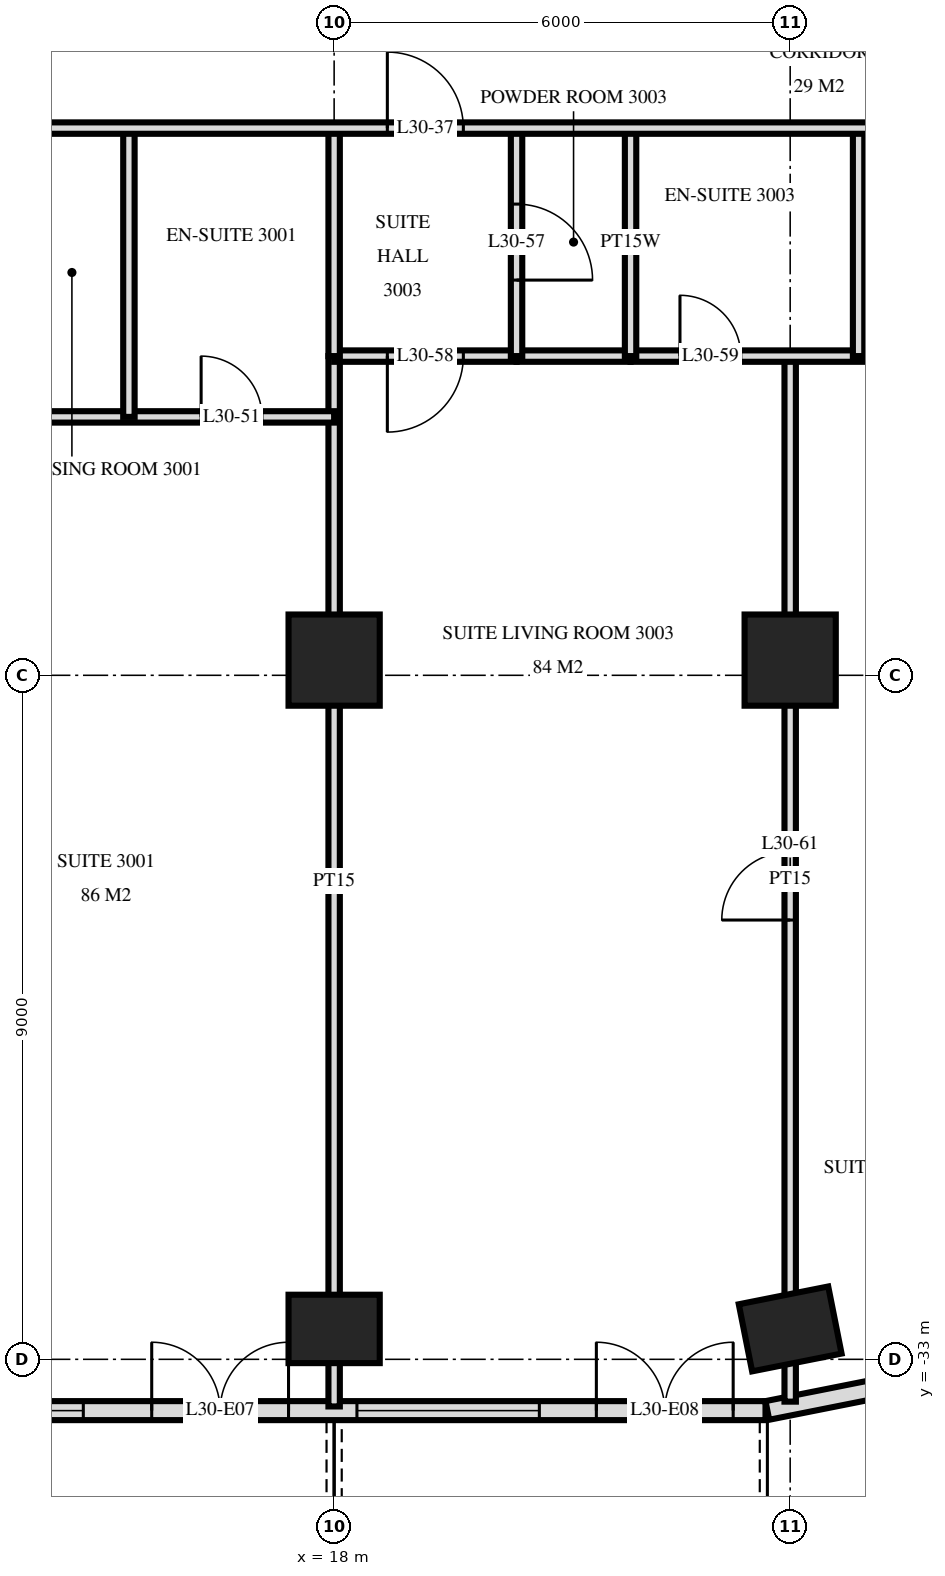
"""IFC4 building model, lengths in metres.
Left out: names, types, materials, properties, quantities, classifications, styles, units other than length and angle.
Written with IfcOpenShell. Run it as: python <this file> out.ifc"""

import sys

from ifc_helpers import new_model, si_unit, direction, frame, frame_2d, origin, origin_2d, place, context, subcontext, project, spatial, rectangle, extrude, element, fill, save


model = new_model("IFC4")
c1 = context("Model", 3, precision=1e-05, world=origin(), true_north=direction((0.0, 1.0)))
c2 = subcontext(c1, "Body", "Model", "MODEL_VIEW")
j1 = project(units=[si_unit("LENGTHUNIT", "METRE"), si_unit("PLANEANGLEUNIT", "RADIAN")], contexts=[c1])
p1 = place(None, origin())
s1 = spatial("IfcSite", under=j1, at=p1, CompositionType="ELEMENT")
p2 = place(p1, origin())
s2 = spatial("IfcBuilding", under=s1, at=p2, CompositionType="ELEMENT")
p3 = place(p2, frame((0.0, 0.0, 120.0)))
s3 = spatial("IfcBuildingStorey", under=s2, at=p3, CompositionType="ELEMENT", Elevation=120.0)
p4 = place(p3, frame((18.0, -32.6, 0.0), z_axis=(0.0, 0.0, 1.0), x_axis=(1.0, 0.0, 0.0)))
e1 = element("IfcColumn", 1, at=p4, inside=s3, PredefinedType="COLUMN", context=c2, shape_type="SweptSolid", body=[
    extrude(rectangle(XDim=1.2, YDim=0.9, at=origin_2d()), origin(), (0.0, 0.0, 1.0), 3.6),
])
p5 = place(p3, frame((18.0, -23.8, 0.0), z_axis=(0.0, 0.0, 1.0), x_axis=(1.0, 0.0, 0.0)))
e2 = element("IfcColumn", 2, at=p5, inside=s3, PredefinedType="COLUMN", context=c2, shape_type="SweptSolid", body=[
    extrude(rectangle(XDim=1.2, YDim=1.2, at=origin_2d()), origin(), (0.0, 0.0, 1.0), 3.6),
])
p6 = place(p3, frame((24.0, -32.6, 0.0), z_axis=(0.0, 0.0, 1.0), x_axis=(0.980792089743, 0.195056086032, 0.0)))
e3 = element("IfcColumn", 3, at=p6, inside=s3, PredefinedType="COLUMN", context=c2, shape_type="SweptSolid", body=[
    extrude(rectangle(XDim=1.2, YDim=0.9, at=origin_2d()), origin(), (0.0, 0.0, 1.0), 3.6),
])
p7 = place(p3, frame((24.0, -23.8, 0.0), z_axis=(0.0, 0.0, 1.0), x_axis=(1.0, 0.0, 0.0)))
e4 = element("IfcColumn", 4, at=p7, inside=s3, PredefinedType="COLUMN", context=c2, shape_type="SweptSolid", body=[
    extrude(rectangle(XDim=1.2, YDim=1.2, at=origin_2d()), origin(), (0.0, 0.0, 1.0), 3.6),
])
p8 = place(p3, frame((-23.675, -33.675, 0.0), z_axis=(0.0, 0.0, 1.0), x_axis=(1.0, 0.0, 0.0)))
e5 = element("IfcWall", 5, at=p8, inside=s3, PredefinedType="SOLIDWALL", context=c2, shape_type="SweptSolid", body=[
    extrude(rectangle(XDim=47.351, YDim=0.25, at=frame_2d((23.675, 0.0))), origin(), (0.0, 0.0, 1.0), 3.32),
])
p9 = place(p8, frame((0.275, 0.0, 0.3)))
e6 = element("IfcOpeningElement", 6, at=p9, cuts=e5, PredefinedType="OPENING", context=c2, shape_type="SweptSolid", body=[
    extrude(rectangle(XDim=2.4, YDim=2.1, at=frame_2d((1.2, 1.05))), frame((0.0, 0.135, 0.0), z_axis=(0.0, -1.0, 0.0), x_axis=(1.0, 0.0, 0.0)), (0.0, 0.0, 1.0), 0.27),
])
p10 = place(p8, frame((3.425, 0.0, 0.0)))
e7 = element("IfcOpeningElement", 7, at=p10, cuts=e5, PredefinedType="OPENING", context=c2, shape_type="SweptSolid", body=[
    extrude(rectangle(XDim=1.8, YDim=2.4, at=frame_2d((0.9, 1.2))), frame((0.0, 0.135, 0.0), z_axis=(0.0, -1.0, 0.0), x_axis=(1.0, 0.0, 0.0)), (0.0, 0.0, 1.0), 0.27),
])
p11 = place(p8, frame((7.775, 0.0, 0.0)))
e8 = element("IfcOpeningElement", 8, at=p11, cuts=e5, PredefinedType="OPENING", context=c2, shape_type="SweptSolid", body=[
    extrude(rectangle(XDim=1.8, YDim=2.4, at=frame_2d((0.9, 1.2))), frame((0.0, 0.135, 0.0), z_axis=(0.0, -1.0, 0.0), x_axis=(1.0, 0.0, 0.0)), (0.0, 0.0, 1.0), 0.27),
])
p12 = place(p8, frame((12.275, 0.0, 0.0)))
e9 = element("IfcOpeningElement", 9, at=p12, cuts=e5, PredefinedType="OPENING", context=c2, shape_type="SweptSolid", body=[
    extrude(rectangle(XDim=1.8, YDim=2.4, at=frame_2d((0.9, 1.2))), frame((0.0, 0.135, 0.0), z_axis=(0.0, -1.0, 0.0), x_axis=(1.0, 0.0, 0.0)), (0.0, 0.0, 1.0), 0.27),
])
p13 = place(p8, frame((14.975, 0.0, 0.3)))
e10 = element("IfcOpeningElement", 10, at=p13, cuts=e5, PredefinedType="OPENING", context=c2, shape_type="SweptSolid", body=[
    extrude(rectangle(XDim=2.4, YDim=2.1, at=frame_2d((1.2, 1.05))), frame((0.0, 0.135, 0.0), z_axis=(0.0, -1.0, 0.0), x_axis=(1.0, 0.0, 0.0)), (0.0, 0.0, 1.0), 0.27),
])
p14 = place(p8, frame((17.975, 0.0, 0.3)))
e11 = element("IfcOpeningElement", 11, at=p14, cuts=e5, PredefinedType="OPENING", context=c2, shape_type="SweptSolid", body=[
    extrude(rectangle(XDim=2.4, YDim=2.1, at=frame_2d((1.2, 1.05))), frame((0.0, 0.135, 0.0), z_axis=(0.0, -1.0, 0.0), x_axis=(1.0, 0.0, 0.0)), (0.0, 0.0, 1.0), 0.27),
])
p15 = place(p8, frame((21.275, 0.0, 0.0)))
e12 = element("IfcOpeningElement", 12, at=p15, cuts=e5, PredefinedType="OPENING", context=c2, shape_type="SweptSolid", body=[
    extrude(rectangle(XDim=1.8, YDim=2.4, at=frame_2d((0.9, 1.2))), frame((0.0, 0.135, 0.0), z_axis=(0.0, -1.0, 0.0), x_axis=(1.0, 0.0, 0.0)), (0.0, 0.0, 1.0), 0.27),
])
p16 = place(p8, frame((24.275, 0.0, 0.0)))
e13 = element("IfcOpeningElement", 13, at=p16, cuts=e5, PredefinedType="OPENING", context=c2, shape_type="SweptSolid", body=[
    extrude(rectangle(XDim=1.8, YDim=2.4, at=frame_2d((0.9, 1.2))), frame((0.0, 0.135, 0.0), z_axis=(0.0, -1.0, 0.0), x_axis=(1.0, 0.0, 0.0)), (0.0, 0.0, 1.0), 0.27),
])
p17 = place(p8, frame((26.975, 0.0, 0.3)))
e14 = element("IfcOpeningElement", 14, at=p17, cuts=e5, PredefinedType="OPENING", context=c2, shape_type="SweptSolid", body=[
    extrude(rectangle(XDim=2.4, YDim=2.1, at=frame_2d((1.2, 1.05))), frame((0.0, 0.135, 0.0), z_axis=(0.0, -1.0, 0.0), x_axis=(1.0, 0.0, 0.0)), (0.0, 0.0, 1.0), 0.27),
])
p18 = place(p8, frame((30.275, 0.0, 0.0)))
e15 = element("IfcOpeningElement", 15, at=p18, cuts=e5, PredefinedType="OPENING", context=c2, shape_type="SweptSolid", body=[
    extrude(rectangle(XDim=1.8, YDim=2.4, at=frame_2d((0.9, 1.2))), frame((0.0, 0.135, 0.0), z_axis=(0.0, -1.0, 0.0), x_axis=(1.0, 0.0, 0.0)), (0.0, 0.0, 1.0), 0.27),
])
p19 = place(p8, frame((32.975, 0.0, 0.3)))
e16 = element("IfcOpeningElement", 16, at=p19, cuts=e5, PredefinedType="OPENING", context=c2, shape_type="SweptSolid", body=[
    extrude(rectangle(XDim=2.4, YDim=2.1, at=frame_2d((1.2, 1.05))), frame((0.0, 0.135, 0.0), z_axis=(0.0, -1.0, 0.0), x_axis=(1.0, 0.0, 0.0)), (0.0, 0.0, 1.0), 0.27),
])
p20 = place(p8, frame((35.975, 0.0, 0.3)))
e17 = element("IfcOpeningElement", 17, at=p20, cuts=e5, PredefinedType="OPENING", context=c2, shape_type="SweptSolid", body=[
    extrude(rectangle(XDim=2.4, YDim=2.1, at=frame_2d((1.2, 1.05))), frame((0.0, 0.135, 0.0), z_axis=(0.0, -1.0, 0.0), x_axis=(1.0, 0.0, 0.0)), (0.0, 0.0, 1.0), 0.27),
])
p21 = place(p8, frame((39.275, 0.0, 0.0)))
e18 = element("IfcOpeningElement", 18, at=p21, cuts=e5, PredefinedType="OPENING", context=c2, shape_type="SweptSolid", body=[
    extrude(rectangle(XDim=1.8, YDim=2.4, at=frame_2d((0.9, 1.2))), frame((0.0, 0.135, 0.0), z_axis=(0.0, -1.0, 0.0), x_axis=(1.0, 0.0, 0.0)), (0.0, 0.0, 1.0), 0.27),
])
p22 = place(p8, frame((41.975, 0.0, 0.3)))
e19 = element("IfcOpeningElement", 19, at=p22, cuts=e5, PredefinedType="OPENING", context=c2, shape_type="SweptSolid", body=[
    extrude(rectangle(XDim=2.4, YDim=2.1, at=frame_2d((1.2, 1.05))), frame((0.0, 0.135, 0.0), z_axis=(0.0, -1.0, 0.0), x_axis=(1.0, 0.0, 0.0)), (0.0, 0.0, 1.0), 0.27),
])
p23 = place(p8, frame((45.125, 0.0, 0.0)))
e20 = element("IfcOpeningElement", 20, at=p23, cuts=e5, PredefinedType="OPENING", context=c2, shape_type="SweptSolid", body=[
    extrude(rectangle(XDim=1.8, YDim=2.4, at=frame_2d((0.9, 1.2))), frame((0.0, 0.135, 0.0), z_axis=(0.0, -1.0, 0.0), x_axis=(1.0, 0.0, 0.0)), (0.0, 0.0, 1.0), 0.27),
])
p24 = place(p3, frame((23.7, -33.673, 0.0), z_axis=(0.0, 0.0, 1.0), x_axis=(0.980775640221, 0.19513878023, 0.0)))
e21 = element("IfcWall", 21, at=p24, inside=s3, PredefinedType="SOLIDWALL", context=c2, shape_type="SweptSolid", body=[
    extrude(rectangle(XDim=1.681, YDim=0.25, at=frame_2d((0.841, 0.0))), origin(), (0.0, 0.0, 1.0), 3.32),
])
p25 = place(p3, frame((24.9, -19.8, 0.0), z_axis=(0.0, 0.0, 1.0), x_axis=(0.0, 1.0, 0.0)))
e22 = element("IfcWall", 22, at=p25, inside=s3, PredefinedType="PARTITIONING", context=c2, shape_type="SweptSolid", body=[
    extrude(rectangle(XDim=3.0, YDim=0.15, at=frame_2d((1.5, 0.0))), origin(), (0.0, 0.0, 1.0), 3.32),
])
p26 = place(p3, frame((24.0, -33.557, 0.0), z_axis=(0.0, 0.0, 1.0), x_axis=(0.0, 1.0, 0.0)))
e23 = element("IfcWall", 23, at=p26, inside=s3, PredefinedType="PARTITIONING", context=c2, shape_type="SweptSolid", body=[
    extrude(rectangle(XDim=13.757, YDim=0.15, at=frame_2d((6.878, 0.0))), origin(), (0.0, 0.0, 1.0), 3.32),
])
p27 = place(p26, frame((6.337, 0.0, 0.0)))
e24 = element("IfcOpeningElement", 24, at=p27, cuts=e23, PredefinedType="OPENING", context=c2, shape_type="SweptSolid", body=[
    extrude(rectangle(XDim=0.9, YDim=2.1, at=frame_2d((0.45, 1.05))), frame((0.0, 0.085, 0.0), z_axis=(0.0, -1.0, 0.0), x_axis=(1.0, 0.0, 0.0)), (0.0, 0.0, 1.0), 0.17),
])
p28 = place(p3, frame((21.9, -19.8, 0.0), z_axis=(0.0, 0.0, 1.0), x_axis=(0.0, 1.0, 0.0)))
e25 = element("IfcWall", 25, at=p28, inside=s3, PredefinedType="PLUMBINGWALL", context=c2, shape_type="SweptSolid", body=[
    extrude(rectangle(XDim=3.0, YDim=0.15, at=frame_2d((1.5, 0.0))), origin(), (0.0, 0.0, 1.0), 3.32),
])
p29 = place(p3, frame((20.4, -19.8, 0.0), z_axis=(0.0, 0.0, 1.0), x_axis=(0.0, 1.0, 0.0)))
e26 = element("IfcWall", 26, at=p29, inside=s3, PredefinedType="PARTITIONING", context=c2, shape_type="SweptSolid", body=[
    extrude(rectangle(XDim=3.0, YDim=0.15, at=frame_2d((1.5, 0.0))), origin(), (0.0, 0.0, 1.0), 3.32),
])
p30 = place(p29, frame((1.0, 0.0, 0.0)))
e27 = element("IfcOpeningElement", 27, at=p30, cuts=e26, PredefinedType="OPENING", context=c2, shape_type="SweptSolid", body=[
    extrude(rectangle(XDim=1.0, YDim=2.1, at=frame_2d((0.5, 1.05))), frame((0.0, 0.085, 0.0), z_axis=(0.0, -1.0, 0.0), x_axis=(1.0, 0.0, 0.0)), (0.0, 0.0, 1.0), 0.17),
])
p31 = place(p3, frame((18.0, -19.8, 0.0), z_axis=(0.0, 0.0, 1.0), x_axis=(0.0, 1.0, 0.0)))
e28 = element("IfcWall", 28, at=p31, inside=s3, PredefinedType="PARTITIONING", context=c2, shape_type="SweptSolid", body=[
    extrude(rectangle(XDim=3.0, YDim=0.15, at=frame_2d((1.5, 0.0))), origin(), (0.0, 0.0, 1.0), 3.32),
])
p32 = place(p3, frame((18.0, -33.62, 0.0), z_axis=(0.0, 0.0, 1.0), x_axis=(0.0, 1.0, 0.0)))
e29 = element("IfcWall", 29, at=p32, inside=s3, PredefinedType="PARTITIONING", context=c2, shape_type="SweptSolid", body=[
    extrude(rectangle(XDim=13.82, YDim=0.15, at=frame_2d((6.91, 0.0))), origin(), (0.0, 0.0, 1.0), 3.32),
])
p33 = place(p3, frame((15.3, -20.6, 0.0), z_axis=(0.0, 0.0, 1.0), x_axis=(0.0, 1.0, 0.0)))
e30 = element("IfcWall", 30, at=p33, inside=s3, PredefinedType="PARTITIONING", context=c2, shape_type="SweptSolid", body=[
    extrude(rectangle(XDim=3.8, YDim=0.15, at=frame_2d((1.9, 0.0))), origin(), (0.0, 0.0, 1.0), 3.32),
])
p34 = place(p3, frame((13.8, -20.6, 0.0), z_axis=(0.0, 0.0, 1.0), x_axis=(1.0, 0.0, 0.0)))
e31 = element("IfcWall", 31, at=p34, inside=s3, PredefinedType="PARTITIONING", context=c2, shape_type="SweptSolid", body=[
    extrude(rectangle(XDim=4.2, YDim=0.15, at=frame_2d((2.1, 0.0))), origin(), (0.0, 0.0, 1.0), 3.32),
])
p35 = place(p34, frame((2.45, 0.0, 0.0)))
e32 = element("IfcOpeningElement", 32, at=p35, cuts=e31, PredefinedType="OPENING", context=c2, shape_type="SweptSolid", body=[
    extrude(rectangle(XDim=0.8, YDim=2.1, at=frame_2d((0.4, 1.05))), frame((0.0, 0.085, 0.0), z_axis=(0.0, -1.0, 0.0), x_axis=(1.0, 0.0, 0.0)), (0.0, 0.0, 1.0), 0.17),
])
p36 = place(p3, frame((18.0, -19.8, 0.0), z_axis=(0.0, 0.0, 1.0), x_axis=(1.0, 0.0, 0.0)))
e33 = element("IfcWall", 33, at=p36, inside=s3, PredefinedType="PARTITIONING", context=c2, shape_type="SweptSolid", body=[
    extrude(rectangle(XDim=2.4, YDim=0.15, at=frame_2d((1.2, 0.0))), origin(), (0.0, 0.0, 1.0), 3.32),
])
p37 = place(p36, frame((0.7, 0.0, 0.0)))
e34 = element("IfcOpeningElement", 34, at=p37, cuts=e33, PredefinedType="OPENING", context=c2, shape_type="SweptSolid", body=[
    extrude(rectangle(XDim=1.0, YDim=2.1, at=frame_2d((0.5, 1.05))), frame((0.0, 0.085, 0.0), z_axis=(0.0, -1.0, 0.0), x_axis=(1.0, 0.0, 0.0)), (0.0, 0.0, 1.0), 0.17),
])
p38 = place(p3, frame((21.9, -19.8, 0.0), z_axis=(0.0, 0.0, 1.0), x_axis=(1.0, 0.0, 0.0)))
e35 = element("IfcWall", 35, at=p38, inside=s3, PredefinedType="PARTITIONING", context=c2, shape_type="SweptSolid", body=[
    extrude(rectangle(XDim=6.12, YDim=0.15, at=frame_2d((3.06, 0.0))), origin(), (0.0, 0.0, 1.0), 3.32),
])
p39 = place(p38, frame((0.65, 0.0, 0.0)))
e36 = element("IfcOpeningElement", 36, at=p39, cuts=e35, PredefinedType="OPENING", context=c2, shape_type="SweptSolid", body=[
    extrude(rectangle(XDim=0.8, YDim=2.1, at=frame_2d((0.4, 1.05))), frame((0.0, 0.085, 0.0), z_axis=(0.0, -1.0, 0.0), x_axis=(1.0, 0.0, 0.0)), (0.0, 0.0, 1.0), 0.17),
])
p40 = place(p38, frame((4.2, 0.0, 0.0)))
e37 = element("IfcOpeningElement", 37, at=p40, cuts=e35, PredefinedType="OPENING", context=c2, shape_type="SweptSolid", body=[
    extrude(rectangle(XDim=0.9, YDim=2.1, at=frame_2d((0.45, 1.05))), frame((0.0, 0.085, 0.0), z_axis=(0.0, -1.0, 0.0), x_axis=(1.0, 0.0, 0.0)), (0.0, 0.0, 1.0), 0.17),
])
p41 = place(p3, frame((20.4, -19.8, 0.0), z_axis=(0.0, 0.0, 1.0), x_axis=(1.0, 0.0, 0.0)))
e38 = element("IfcWall", 38, at=p41, inside=s3, PredefinedType="PLUMBINGWALL", context=c2, shape_type="SweptSolid", body=[
    extrude(rectangle(XDim=1.5, YDim=0.15, at=frame_2d((0.75, 0.0))), origin(), (0.0, 0.0, 1.0), 3.32),
])
p42 = place(p3, frame((-28.02, -16.8, 0.0), z_axis=(0.0, 0.0, 1.0), x_axis=(1.0, 0.0, 0.0)))
e39 = element("IfcWall", 39, at=p42, inside=s3, PredefinedType="PARTITIONING", context=c2, shape_type="SweptSolid", body=[
    extrude(rectangle(XDim=56.04, YDim=0.15, at=frame_2d((28.02, 0.0))), origin(), (0.0, 0.0, 1.0), 3.32),
])
p43 = place(p42, frame((12.52, 0.0, 0.0)))
e40 = element("IfcOpeningElement", 40, at=p43, cuts=e39, PredefinedType="OPENING", context=c2, shape_type="SweptSolid", body=[
    extrude(rectangle(XDim=1.0, YDim=2.1, at=frame_2d((0.5, 1.05))), frame((0.0, 0.085, 0.0), z_axis=(0.0, -1.0, 0.0), x_axis=(1.0, 0.0, 0.0)), (0.0, 0.0, 1.0), 0.17),
])
p44 = place(p42, frame((8.32, 0.0, 0.0)))
e41 = element("IfcOpeningElement", 41, at=p44, cuts=e39, PredefinedType="OPENING", context=c2, shape_type="SweptSolid", body=[
    extrude(rectangle(XDim=1.0, YDim=2.1, at=frame_2d((0.5, 1.05))), frame((0.0, 0.085, 0.0), z_axis=(0.0, -1.0, 0.0), x_axis=(1.0, 0.0, 0.0)), (0.0, 0.0, 1.0), 0.17),
])
p45 = place(p42, frame((40.42, 0.0, 0.0)))
e42 = element("IfcOpeningElement", 42, at=p45, cuts=e39, PredefinedType="OPENING", context=c2, shape_type="SweptSolid", body=[
    extrude(rectangle(XDim=1.0, YDim=2.1, at=frame_2d((0.5, 1.05))), frame((0.0, 0.085, 0.0), z_axis=(0.0, -1.0, 0.0), x_axis=(1.0, 0.0, 0.0)), (0.0, 0.0, 1.0), 0.17),
])
p46 = place(p42, frame((46.72, 0.0, 0.0)))
e43 = element("IfcOpeningElement", 43, at=p46, cuts=e39, PredefinedType="OPENING", context=c2, shape_type="SweptSolid", body=[
    extrude(rectangle(XDim=1.0, YDim=2.1, at=frame_2d((0.5, 1.05))), frame((0.0, 0.085, 0.0), z_axis=(0.0, -1.0, 0.0), x_axis=(1.0, 0.0, 0.0)), (0.0, 0.0, 1.0), 0.17),
])
p47 = place(p42, frame((21.52, 0.0, 0.0)))
e44 = element("IfcOpeningElement", 44, at=p47, cuts=e39, PredefinedType="OPENING", context=c2, shape_type="SweptSolid", body=[
    extrude(rectangle(XDim=1.0, YDim=2.1, at=frame_2d((0.5, 1.05))), frame((0.0, 0.085, 0.0), z_axis=(0.0, -1.0, 0.0), x_axis=(1.0, 0.0, 0.0)), (0.0, 0.0, 1.0), 0.17),
])
p48 = place(p42, frame((30.52, 0.0, 0.0)))
e45 = element("IfcOpeningElement", 45, at=p48, cuts=e39, PredefinedType="OPENING", context=c2, shape_type="SweptSolid", body=[
    extrude(rectangle(XDim=1.0, YDim=2.1, at=frame_2d((0.5, 1.05))), frame((0.0, 0.085, 0.0), z_axis=(0.0, -1.0, 0.0), x_axis=(1.0, 0.0, 0.0)), (0.0, 0.0, 1.0), 0.17),
])
p49 = place(p42, frame((36.52, 0.0, 0.0)))
e46 = element("IfcOpeningElement", 46, at=p49, cuts=e39, PredefinedType="OPENING", context=c2, shape_type="SweptSolid", body=[
    extrude(rectangle(XDim=1.0, YDim=2.1, at=frame_2d((0.5, 1.05))), frame((0.0, 0.085, 0.0), z_axis=(0.0, -1.0, 0.0), x_axis=(1.0, 0.0, 0.0)), (0.0, 0.0, 1.0), 0.17),
])
p50 = place(p20, origin())
e47 = element("IfcWindow", 47, at=p50, inside=s3, PartitioningType="SINGLE_PANEL", PredefinedType="WINDOW", context=c2, shape_type="SweptSolid", body=[
    extrude(rectangle(XDim=2.4, YDim=2.1, at=frame_2d((1.2, 1.05))), frame((0.0, 0.03, 0.0), z_axis=(0.0, -1.0, 0.0), x_axis=(1.0, 0.0, 0.0)), (0.0, 0.0, 1.0), 0.06),
])
fill(e17, e47)
p51 = place(p21, origin())
e48 = element("IfcDoor", 48, at=p51, inside=s3, OperationType="DOUBLE_DOOR_SINGLE_SWING", PredefinedType="DOOR", context=c2, shape_type="SweptSolid", body=[
    extrude(rectangle(XDim=1.8, YDim=2.4, at=frame_2d((0.9, 1.2))), frame((0.0, 0.025, 0.0), z_axis=(0.0, -1.0, 0.0), x_axis=(1.0, 0.0, 0.0)), (0.0, 0.0, 1.0), 0.05),
])
fill(e18, e48)
p52 = place(p22, origin())
e49 = element("IfcWindow", 49, at=p52, inside=s3, PartitioningType="SINGLE_PANEL", PredefinedType="WINDOW", context=c2, shape_type="SweptSolid", body=[
    extrude(rectangle(XDim=2.4, YDim=2.1, at=frame_2d((1.2, 1.05))), frame((0.0, 0.03, 0.0), z_axis=(0.0, -1.0, 0.0), x_axis=(1.0, 0.0, 0.0)), (0.0, 0.0, 1.0), 0.06),
])
fill(e19, e49)
p53 = place(p23, origin())
e50 = element("IfcDoor", 50, at=p53, inside=s3, OperationType="DOUBLE_DOOR_SINGLE_SWING", PredefinedType="DOOR", context=c2, shape_type="SweptSolid", body=[
    extrude(rectangle(XDim=1.8, YDim=2.4, at=frame_2d((0.9, 1.2))), frame((0.0, 0.025, 0.0), z_axis=(0.0, -1.0, 0.0), x_axis=(1.0, 0.0, 0.0)), (0.0, 0.0, 1.0), 0.05),
])
fill(e20, e50)
p54 = place(p46, origin())
e51 = element("IfcDoor", 51, at=p54, inside=s3, OperationType="SINGLE_SWING_RIGHT", PredefinedType="DOOR", context=c2, shape_type="SweptSolid", body=[
    extrude(rectangle(XDim=1.0, YDim=2.1, at=frame_2d((0.5, 1.05))), frame((0.0, 0.025, 0.0), z_axis=(0.0, -1.0, 0.0), x_axis=(1.0, 0.0, 0.0)), (0.0, 0.0, 1.0), 0.05),
])
fill(e43, e51)
p55 = place(p35, origin())
e52 = element("IfcDoor", 52, at=p55, inside=s3, OperationType="SINGLE_SWING_RIGHT", PredefinedType="DOOR", context=c2, shape_type="SweptSolid", body=[
    extrude(rectangle(XDim=0.8, YDim=2.1, at=frame_2d((0.4, 1.05))), frame((0.0, 0.025, 0.0), z_axis=(0.0, -1.0, 0.0), x_axis=(1.0, 0.0, 0.0)), (0.0, 0.0, 1.0), 0.05),
])
fill(e32, e52)
p56 = place(p30, frame((0.5, 0.0, 0.0), z_axis=(0.0, 0.0, 1.0), x_axis=(-1.0, 0.0, 0.0)))
e53 = element("IfcDoor", 53, at=p56, inside=s3, OperationType="SINGLE_SWING_LEFT", PredefinedType="DOOR", context=c2, shape_type="SweptSolid", body=[
    extrude(rectangle(XDim=1.0, YDim=2.1, at=frame_2d((0.0, 1.05))), frame((0.0, -0.025, 0.0), z_axis=(0.0, 1.0, 0.0), x_axis=(-1.0, 0.0, 0.0)), (0.0, 0.0, 1.0), 0.05),
])
fill(e27, e53)
p57 = place(p37, frame((0.5, 0.0, 0.0), z_axis=(0.0, 0.0, 1.0), x_axis=(-1.0, 0.0, 0.0)))
e54 = element("IfcDoor", 54, at=p57, inside=s3, OperationType="SINGLE_SWING_LEFT", PredefinedType="DOOR", context=c2, shape_type="SweptSolid", body=[
    extrude(rectangle(XDim=1.0, YDim=2.1, at=frame_2d((0.0, 1.05))), frame((0.0, -0.025, 0.0), z_axis=(0.0, 1.0, 0.0), x_axis=(-1.0, 0.0, 0.0)), (0.0, 0.0, 1.0), 0.05),
])
fill(e34, e54)
p58 = place(p39, origin())
e55 = element("IfcDoor", 55, at=p58, inside=s3, OperationType="SINGLE_SWING_RIGHT", PredefinedType="DOOR", context=c2, shape_type="SweptSolid", body=[
    extrude(rectangle(XDim=0.8, YDim=2.1, at=frame_2d((0.4, 1.05))), frame((0.0, 0.025, 0.0), z_axis=(0.0, -1.0, 0.0), x_axis=(1.0, 0.0, 0.0)), (0.0, 0.0, 1.0), 0.05),
])
fill(e36, e55)
p59 = place(p27, origin())
e56 = element("IfcDoor", 56, at=p59, inside=s3, OperationType="SINGLE_SWING_RIGHT", PredefinedType="DOOR", context=c2, shape_type="SweptSolid", body=[
    extrude(rectangle(XDim=0.9, YDim=2.1, at=frame_2d((0.45, 1.05))), frame((0.0, 0.025, 0.0), z_axis=(0.0, -1.0, 0.0), x_axis=(1.0, 0.0, 0.0)), (0.0, 0.0, 1.0), 0.05),
])
fill(e24, e56)
save(model, sys.argv[1])
